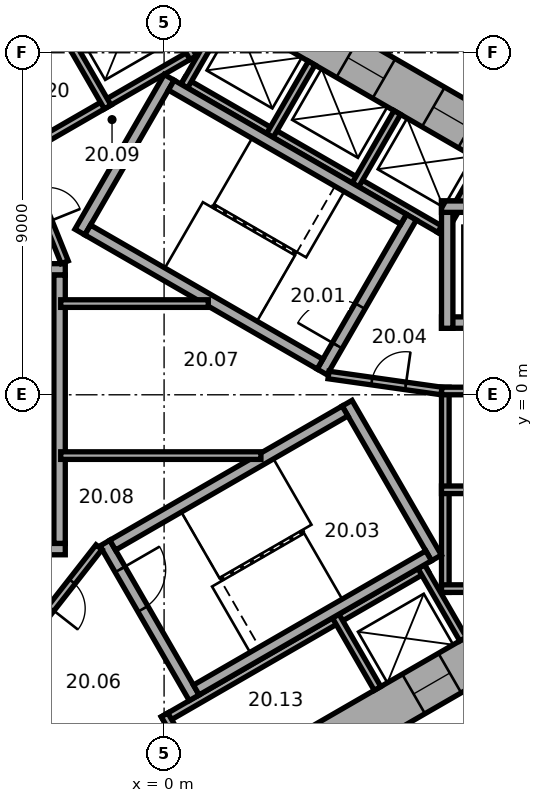
"""IFC4 building model, lengths in metres.
Left out: names, types, materials, properties, quantities, classifications, styles, units other than length and angle.
Written with IfcOpenShell. Run it as: python <this file> out.ifc"""

import sys

from ifc_helpers import new_model, si_unit, direction, frame, frame_2d, origin, place, context, subcontext, project, spatial, rectangle, extrude, element, fill, save


model = new_model("IFC4")
c1 = context("Model", 3, precision=1e-05, world=origin(), true_north=direction((0.0, 1.0)))
c2 = subcontext(c1, "Body", "Model", "MODEL_VIEW")
j1 = project(units=[si_unit("LENGTHUNIT", "METRE"), si_unit("PLANEANGLEUNIT", "RADIAN")], contexts=[c1])
p1 = place(None, origin())
s1 = spatial("IfcSite", under=j1, at=p1, CompositionType="ELEMENT")
p2 = place(p1, origin())
s2 = spatial("IfcBuilding", under=s1, at=p2, CompositionType="ELEMENT")
p3 = place(p2, frame((0.0, 0.0, 90.2)))
s3 = spatial("IfcBuildingStorey", under=s2, at=p3, CompositionType="ELEMENT", Elevation=90.2)
p4 = place(p3, frame((10.4, 5.658, 0.0), z_axis=(0.0, 0.0, 1.0), x_axis=(-0.866021384402, 0.500006961711, 0.0)))
e1 = element("IfcWall", 1, at=p4, inside=s3, PredefinedType="SHEAR", context=c2, shape_type="SweptSolid", body=[
    extrude(rectangle(XDim=12.355, YDim=1.2, at=frame_2d((6.178, 0.0))), origin(), (0.0, 0.0, 1.0), 3.3),
])
p5 = place(p4, frame((2.728, 0.0, 0.0)))
e2 = element("IfcOpeningElement", 2, at=p5, cuts=e1, PredefinedType="OPENING", context=c2, shape_type="SweptSolid", body=[
    extrude(rectangle(XDim=1.1, YDim=2.1, at=frame_2d((0.55, 1.05))), frame((0.0, 0.61, 0.0), z_axis=(0.0, -1.0, 0.0), x_axis=(1.0, 0.0, 0.0)), (0.0, 0.0, 1.0), 1.22),
])
p6 = place(p4, frame((5.328, 0.0, 0.0)))
e3 = element("IfcOpeningElement", 3, at=p6, cuts=e1, PredefinedType="OPENING", context=c2, shape_type="SweptSolid", body=[
    extrude(rectangle(XDim=1.1, YDim=2.1, at=frame_2d((0.55, 1.05))), frame((0.0, 0.61, 0.0), z_axis=(0.0, -1.0, 0.0), x_axis=(1.0, 0.0, 0.0)), (0.0, 0.0, 1.0), 1.22),
])
p7 = place(p4, frame((7.928, 0.0, 0.0)))
e4 = element("IfcOpeningElement", 4, at=p7, cuts=e1, PredefinedType="OPENING", context=c2, shape_type="SweptSolid", body=[
    extrude(rectangle(XDim=1.1, YDim=2.1, at=frame_2d((0.55, 1.05))), frame((0.0, 0.61, 0.0), z_axis=(0.0, -1.0, 0.0), x_axis=(1.0, 0.0, 0.0)), (0.0, 0.0, 1.0), 1.22),
])
p8 = place(p3, frame((0.3, 11.836, 0.0), z_axis=(0.0, 0.0, 1.0), x_axis=(-0.866021384402, -0.500006961711, 0.0)))
e5 = element("IfcWall", 5, at=p8, inside=s3, PredefinedType="SHEAR", context=c2, shape_type="SweptSolid", body=[
    extrude(rectangle(XDim=12.355, YDim=1.2, at=frame_2d((6.178, 0.0))), origin(), (0.0, 0.0, 1.0), 3.3),
])
p9 = place(p8, frame((6.378, 0.0, 0.0)))
e6 = element("IfcOpeningElement", 6, at=p9, cuts=e5, PredefinedType="OPENING", context=c2, shape_type="SweptSolid", body=[
    extrude(rectangle(XDim=1.5, YDim=2.1, at=frame_2d((0.75, 1.05))), frame((0.0, 0.61, 0.0), z_axis=(0.0, -1.0, 0.0), x_axis=(1.0, 0.0, 0.0)), (0.0, 0.0, 1.0), 1.22),
])
p10 = place(p8, frame((1.828, 0.0, 0.0)))
e7 = element("IfcOpeningElement", 7, at=p10, cuts=e5, PredefinedType="OPENING", context=c2, shape_type="SweptSolid", body=[
    extrude(rectangle(XDim=1.1, YDim=2.1, at=frame_2d((0.55, 1.05))), frame((0.0, 0.61, 0.0), z_axis=(0.0, -1.0, 0.0), x_axis=(1.0, 0.0, 0.0)), (0.0, 0.0, 1.0), 1.22),
])
p11 = place(p3, frame((-10.4, -5.658, 0.0), z_axis=(0.0, 0.0, 1.0), x_axis=(0.866021384402, -0.500006961711, 0.0)))
e8 = element("IfcWall", 8, at=p11, inside=s3, PredefinedType="SHEAR", context=c2, shape_type="SweptSolid", body=[
    extrude(rectangle(XDim=12.355, YDim=1.2, at=frame_2d((6.178, 0.0))), origin(), (0.0, 0.0, 1.0), 3.3),
])
p12 = place(p11, frame((6.378, 0.0, 0.0)))
e9 = element("IfcOpeningElement", 9, at=p12, cuts=e8, PredefinedType="OPENING", context=c2, shape_type="SweptSolid", body=[
    extrude(rectangle(XDim=1.5, YDim=2.1, at=frame_2d((0.75, 1.05))), frame((0.0, 0.61, 0.0), z_axis=(0.0, -1.0, 0.0), x_axis=(1.0, 0.0, 0.0)), (0.0, 0.0, 1.0), 1.22),
])
p13 = place(p11, frame((3.228, 0.0, 0.0)))
e10 = element("IfcOpeningElement", 10, at=p13, cuts=e8, PredefinedType="OPENING", context=c2, shape_type="SweptSolid", body=[
    extrude(rectangle(XDim=0.9, YDim=2.1, at=frame_2d((0.45, 1.05))), frame((0.0, 0.61, 0.0), z_axis=(0.0, -1.0, 0.0), x_axis=(1.0, 0.0, 0.0)), (0.0, 0.0, 1.0), 1.22),
])
p14 = place(p3, frame((-0.3, -11.836, 0.0), z_axis=(0.0, 0.0, 1.0), x_axis=(0.866021384402, 0.500006961711, 0.0)))
e11 = element("IfcWall", 11, at=p14, inside=s3, PredefinedType="SHEAR", context=c2, shape_type="SweptSolid", body=[
    extrude(rectangle(XDim=12.355, YDim=1.2, at=frame_2d((6.178, 0.0))), origin(), (0.0, 0.0, 1.0), 3.3),
])
p15 = place(p14, frame((4.128, 0.0, 0.0)))
e12 = element("IfcOpeningElement", 12, at=p15, cuts=e11, PredefinedType="OPENING", context=c2, shape_type="SweptSolid", body=[
    extrude(rectangle(XDim=0.9, YDim=2.1, at=frame_2d((0.45, 1.05))), frame((0.0, 0.61, 0.0), z_axis=(0.0, -1.0, 0.0), x_axis=(1.0, 0.0, 0.0)), (0.0, 0.0, 1.0), 1.22),
])
p16 = place(p14, frame((7.928, 0.0, 0.0)))
e13 = element("IfcOpeningElement", 13, at=p16, cuts=e11, PredefinedType="OPENING", context=c2, shape_type="SweptSolid", body=[
    extrude(rectangle(XDim=1.1, YDim=2.1, at=frame_2d((0.55, 1.05))), frame((0.0, 0.61, 0.0), z_axis=(0.0, -1.0, 0.0), x_axis=(1.0, 0.0, 0.0)), (0.0, 0.0, 1.0), 1.22),
])
p17 = place(p3, frame((7.4, -5.2, 0.0), z_axis=(0.0, 0.0, 1.0), x_axis=(0.0, 1.0, 0.0)))
e14 = element("IfcWall", 14, at=p17, inside=s3, PredefinedType="PARTITIONING", context=c2, shape_type="SweptSolid", body=[
    extrude(rectangle(XDim=5.4, YDim=0.2, at=frame_2d((2.7, 0.0))), origin(), (0.0, 0.0, 1.0), 3.05),
])
for number, where, z_axis, x_axis in (
    (15, (7.3, -5.1, 0.0), (0.0, 0.0, 1.0), (1.0, 0.0, 0.0)),
    (16, (7.3, -2.5, 0.0), (0.0, 0.0, 1.0), (1.0, 0.0, 0.0)),
    (17, (7.3, 0.1, 0.0), (0.0, 0.0, 1.0), (1.0, 0.0, 0.0)),
):
    element("IfcWall", number, at=place(p3, frame(where, z_axis=z_axis, x_axis=x_axis)), inside=s3, PredefinedType="PARTITIONING", context=c2, shape_type="SweptSolid", body=[
        extrude(rectangle(XDim=2.2, YDim=0.2, at=frame_2d((1.1, 0.0))), origin(), (0.0, 0.0, 1.0), 3.05),
    ])
p18 = place(p3, frame((7.424, 4.259, 0.0), z_axis=(0.0, 0.0, 1.0), x_axis=(-0.866026010844, 0.49999894854, 0.0)))
e18 = element("IfcWall", 18, at=p18, inside=s3, PredefinedType="PARTITIONING", context=c2, shape_type="SweptSolid", body=[
    extrude(rectangle(XDim=8.0, YDim=0.2, at=frame_2d((4.0, 0.0))), origin(), (0.0, 0.0, 1.0), 3.05),
])
for number, where, z_axis, x_axis in (
    (19, (7.287, 4.222, 0.0), (0.0, 0.0, 1.0), (0.5, 0.866, 0.0)),
    (20, (5.036, 5.522, 0.0), (0.0, 0.0, 1.0), (0.5, 0.866, 0.0)),
    (21, (2.784, 6.822, 0.0), (0.0, 0.0, 1.0), (0.5, 0.866, 0.0)),
    (22, (0.532, 8.122, 0.0), (0.0, 0.0, 1.0), (0.5, 0.866, 0.0)),
):
    element("IfcWall", number, at=place(p3, frame(where, z_axis=z_axis, x_axis=x_axis)), inside=s3, PredefinedType="PARTITIONING", context=c2, shape_type="SweptSolid", body=[
        extrude(rectangle(XDim=2.2, YDim=0.2, at=frame_2d((1.1, 0.0))), origin(), (0.0, 0.0, 1.0), 3.05),
    ])
p19 = place(p3, frame((0.803, 9.009, 0.0), z_axis=(0.0, 0.0, 1.0), x_axis=(-0.866028230842, -0.499995103361, 0.0)))
e23 = element("IfcWall", 23, at=p19, inside=s3, PredefinedType="PARTITIONING", context=c2, shape_type="SweptSolid", body=[
    extrude(rectangle(XDim=5.4, YDim=0.2, at=frame_2d((2.7, 0.0))), origin(), (0.0, 0.0, 1.0), 3.05),
])
p20 = place(p3, frame((0.767, 8.872, 0.0), z_axis=(0.0, 0.0, 1.0), x_axis=(-0.499994660107, 0.866028486751, 0.0)))
e24 = element("IfcWall", 24, at=p20, inside=s3, PredefinedType="PARTITIONING", context=c2, shape_type="SweptSolid", body=[
    extrude(rectangle(XDim=2.2, YDim=0.2, at=frame_2d((1.1, 0.0))), origin(), (0.0, 0.0, 1.0), 3.05),
])
p21 = place(p3, frame((-1.485, 7.572, 0.0), z_axis=(0.0, 0.0, 1.0), x_axis=(-0.50002983664, 0.866008176907, 0.0)))
e25 = element("IfcWall", 25, at=p21, inside=s3, PredefinedType="PARTITIONING", context=c2, shape_type="SweptSolid", body=[
    extrude(rectangle(XDim=2.2, YDim=0.2, at=frame_2d((1.1, 0.0))), origin(), (0.0, 0.0, 1.0), 3.05),
])
p22 = place(p3, frame((-0.024, -8.559, 0.0), z_axis=(0.0, 0.0, 1.0), x_axis=(0.866026010844, 0.49999894854, 0.0)))
e26 = element("IfcWall", 26, at=p22, inside=s3, PredefinedType="PARTITIONING", context=c2, shape_type="SweptSolid", body=[
    extrude(rectangle(XDim=8.0, YDim=0.2, at=frame_2d((4.0, 0.0))), origin(), (0.0, 0.0, 1.0), 3.05),
])
for number, where, z_axis, x_axis in (
    (27, (0.013, -8.422, 0.0), (0.0, 0.0, 1.0), (0.5, -0.866, 0.0)),
    (28, (4.516, -5.822, 0.0), (0.0, 0.0, 1.0), (0.5, -0.866, 0.0)),
    (29, (6.768, -4.522, 0.0), (0.0, 0.0, 1.0), (0.5, -0.866, 0.0)),
):
    element("IfcWall", number, at=place(p3, frame(where, z_axis=z_axis, x_axis=x_axis)), inside=s3, PredefinedType="PARTITIONING", context=c2, shape_type="SweptSolid", body=[
        extrude(rectangle(XDim=2.2, YDim=0.2, at=frame_2d((1.1, 0.0))), origin(), (0.0, 0.0, 1.0), 3.05),
    ])
p23 = place(p3, frame((4.158, 0.602, 0.0), z_axis=(0.0, 0.0, 1.0), x_axis=(0.499977259774, 0.866038532462, 0.0)))
e30 = element("IfcWall", 30, at=p23, inside=s3, PredefinedType="SHEAR", context=c2, shape_type="SweptSolid", body=[
    extrude(rectangle(XDim=4.7, YDim=0.3, at=frame_2d((2.35, 0.0))), origin(), (0.0, 0.0, 1.0), 3.05),
])
p24 = place(p23, frame((0.8, 0.0, 0.0)))
e31 = element("IfcOpeningElement", 31, at=p24, cuts=e30, PredefinedType="OPENING", context=c2, shape_type="SweptSolid", body=[
    extrude(rectangle(XDim=1.2, YDim=2.1, at=frame_2d((0.6, 1.05))), frame((0.0, 0.16, 0.0), z_axis=(0.0, -1.0, 0.0), x_axis=(1.0, 0.0, 0.0)), (0.0, 0.0, 1.0), 0.32),
])
p25 = place(p3, frame((-2.216, 4.282, 0.0), z_axis=(0.0, 0.0, 1.0), x_axis=(0.499977259774, 0.866038532462, 0.0)))
e32 = element("IfcWall", 32, at=p25, inside=s3, PredefinedType="SHEAR", context=c2, shape_type="SweptSolid", body=[
    extrude(rectangle(XDim=4.7, YDim=0.3, at=frame_2d((2.35, 0.0))), origin(), (0.0, 0.0, 1.0), 3.05),
])
for number, where, z_axis, x_axis in (
    (33, (4.103, 0.807, 0.0), (0.0, 0.0, 1.0), (-0.866, 0.5, 0.0)),
    (34, (6.303, 4.617, 0.0), (0.0, 0.0, 1.0), (-0.866, 0.5, 0.0)),
):
    element("IfcWall", number, at=place(p3, frame(where, z_axis=z_axis, x_axis=x_axis)), inside=s3, PredefinedType="SHEAR", context=c2, shape_type="SweptSolid", body=[
        extrude(rectangle(XDim=7.06, YDim=0.3, at=frame_2d((3.53, 0.0))), origin(), (0.0, 0.0, 1.0), 3.05),
    ])
p26 = place(p3, frame((-2.6, 3.3, 0.0), z_axis=(0.0, 0.0, 1.0), x_axis=(-1.0, 0.0, 0.0)))
e35 = element("IfcWall", 35, at=p26, inside=s3, PredefinedType="SHEAR", context=c2, shape_type="SweptSolid", body=[
    extrude(rectangle(XDim=4.7, YDim=0.3, at=frame_2d((2.35, 0.0))), origin(), (0.0, 0.0, 1.0), 3.05),
])
p27 = place(p26, frame((0.8, 0.0, 0.0)))
e36 = element("IfcOpeningElement", 36, at=p27, cuts=e35, PredefinedType="OPENING", context=c2, shape_type="SweptSolid", body=[
    extrude(rectangle(XDim=1.2, YDim=2.1, at=frame_2d((0.6, 1.05))), frame((0.0, 0.16, 0.0), z_axis=(0.0, -1.0, 0.0), x_axis=(1.0, 0.0, 0.0)), (0.0, 0.0, 1.0), 0.32),
])
p28 = place(p3, frame((-2.6, -4.06, 0.0), z_axis=(0.0, 0.0, 1.0), x_axis=(-1.0, 0.0, 0.0)))
e37 = element("IfcWall", 37, at=p28, inside=s3, PredefinedType="SHEAR", context=c2, shape_type="SweptSolid", body=[
    extrude(rectangle(XDim=4.7, YDim=0.3, at=frame_2d((2.35, 0.0))), origin(), (0.0, 0.0, 1.0), 3.05),
])
p29 = place(p3, frame((-2.75, 3.15, 0.0), z_axis=(0.0, 0.0, 1.0), x_axis=(0.0, -1.0, 0.0)))
e38 = element("IfcWall", 38, at=p29, inside=s3, PredefinedType="SHEAR", context=c2, shape_type="SweptSolid", body=[
    extrude(rectangle(XDim=7.06, YDim=0.3, at=frame_2d((3.53, 0.0))), origin(), (0.0, 0.0, 1.0), 3.05),
])
p30 = place(p3, frame((-1.558, -3.902, 0.0), z_axis=(0.0, 0.0, 1.0), x_axis=(0.499977259774, -0.866038532462, 0.0)))
e39 = element("IfcWall", 39, at=p30, inside=s3, PredefinedType="SHEAR", context=c2, shape_type="SweptSolid", body=[
    extrude(rectangle(XDim=4.7, YDim=0.3, at=frame_2d((2.35, 0.0))), origin(), (0.0, 0.0, 1.0), 3.05),
])
p31 = place(p30, frame((0.8, 0.0, 0.0)))
e40 = element("IfcOpeningElement", 40, at=p31, cuts=e39, PredefinedType="OPENING", context=c2, shape_type="SweptSolid", body=[
    extrude(rectangle(XDim=1.2, YDim=2.1, at=frame_2d((0.6, 1.05))), frame((0.0, 0.16, 0.0), z_axis=(0.0, -1.0, 0.0), x_axis=(1.0, 0.0, 0.0)), (0.0, 0.0, 1.0), 0.32),
])
p32 = place(p3, frame((4.816, -0.222, 0.0), z_axis=(0.0, 0.0, 1.0), x_axis=(0.499977259774, -0.866038532462, 0.0)))
e41 = element("IfcWall", 41, at=p32, inside=s3, PredefinedType="SHEAR", context=c2, shape_type="SweptSolid", body=[
    extrude(rectangle(XDim=4.7, YDim=0.3, at=frame_2d((2.35, 0.0))), origin(), (0.0, 0.0, 1.0), 3.05),
])
for number, where, z_axis, x_axis in (
    (42, (-1.353, -3.957, 0.0), (0.0, 0.0, 1.0), (0.866, 0.5, 0.0)),
    (43, (0.847, -7.767, 0.0), (0.0, 0.0, 1.0), (0.866, 0.5, 0.0)),
):
    element("IfcWall", number, at=place(p3, frame(where, z_axis=z_axis, x_axis=x_axis)), inside=s3, PredefinedType="SHEAR", context=c2, shape_type="SweptSolid", body=[
        extrude(rectangle(XDim=7.06, YDim=0.3, at=frame_2d((3.53, 0.0))), origin(), (0.0, 0.0, 1.0), 3.05),
    ])
p33 = place(p3, frame((7.3, 1.9, 0.0), z_axis=(0.0, 0.0, 1.0), x_axis=(1.0, 0.0, 0.0)))
e44 = element("IfcWall", 44, at=p33, inside=s3, PredefinedType="SHEAR", context=c2, shape_type="SweptSolid", body=[
    extrude(rectangle(XDim=2.2, YDim=0.3, at=frame_2d((1.1, 0.0))), origin(), (0.0, 0.0, 1.0), 3.05),
])
p34 = place(p33, frame((0.7, 0.0, 0.0)))
e45 = element("IfcOpeningElement", 45, at=p34, cuts=e44, PredefinedType="OPENING", context=c2, shape_type="SweptSolid", body=[
    extrude(rectangle(XDim=1.1, YDim=2.1, at=frame_2d((0.55, 1.05))), frame((0.0, 0.16, 0.0), z_axis=(0.0, -1.0, 0.0), x_axis=(1.0, 0.0, 0.0)), (0.0, 0.0, 1.0), 0.32),
])
p35 = place(p3, frame((7.45, 1.75, 0.0), z_axis=(0.0, 0.0, 1.0), x_axis=(0.0, 1.0, 0.0)))
e46 = element("IfcWall", 46, at=p35, inside=s3, PredefinedType="SHEAR", context=c2, shape_type="SweptSolid", body=[
    extrude(rectangle(XDim=3.35, YDim=0.3, at=frame_2d((1.675, 0.0))), origin(), (0.0, 0.0, 1.0), 3.05),
])
p36 = place(p3, frame((7.3, 4.95, 0.0), z_axis=(0.0, 0.0, 1.0), x_axis=(1.0, 0.0, 0.0)))
e47 = element("IfcWall", 47, at=p36, inside=s3, PredefinedType="SHEAR", context=c2, shape_type="SweptSolid", body=[
    extrude(rectangle(XDim=2.2, YDim=0.3, at=frame_2d((1.1, 0.0))), origin(), (0.0, 0.0, 1.0), 3.05),
])
p37 = place(p3, frame((4.327, 0.521, 0.0), z_axis=(0.0, 0.0, 1.0), x_axis=(0.990124376366, -0.14019172346, 0.0)))
e48 = element("IfcWall", 48, at=p37, inside=s3, PredefinedType="PARTITIONING", context=c2, shape_type="SweptSolid", body=[
    extrude(rectangle(XDim=3.002, YDim=0.2, at=frame_2d((1.501, 0.0))), origin(), (0.0, 0.0, 1.0), 3.05),
])
p38 = place(p37, frame((1.15, 0.0, 0.0)))
e49 = element("IfcOpeningElement", 49, at=p38, cuts=e48, PredefinedType="OPENING", context=c2, shape_type="SweptSolid", body=[
    extrude(rectangle(XDim=0.9, YDim=2.1, at=frame_2d((0.45, 1.05))), frame((0.0, 0.11, 0.0), z_axis=(0.0, -1.0, 0.0), x_axis=(1.0, 0.0, 0.0)), (0.0, 0.0, 1.0), 0.22),
])
p39 = place(p3, frame((-2.615, 3.487, 0.0), z_axis=(0.0, 0.0, 1.0), x_axis=(-0.373576831041, 0.92759924068, 0.0)))
e50 = element("IfcWall", 50, at=p39, inside=s3, PredefinedType="PARTITIONING", context=c2, shape_type="SweptSolid", body=[
    extrude(rectangle(XDim=3.002, YDim=0.2, at=frame_2d((1.501, 0.0))), origin(), (0.0, 0.0, 1.0), 3.05),
])
p40 = place(p39, frame((1.15, 0.0, 0.0)))
e51 = element("IfcOpeningElement", 51, at=p40, cuts=e50, PredefinedType="OPENING", context=c2, shape_type="SweptSolid", body=[
    extrude(rectangle(XDim=0.9, YDim=2.1, at=frame_2d((0.45, 1.05))), frame((0.0, 0.11, 0.0), z_axis=(0.0, -1.0, 0.0), x_axis=(1.0, 0.0, 0.0)), (0.0, 0.0, 1.0), 0.22),
])
p41 = place(p3, frame((-1.712, -4.008, 0.0), z_axis=(0.0, 0.0, 1.0), x_axis=(-0.616549420702, -0.787316208287, 0.0)))
e52 = element("IfcWall", 52, at=p41, inside=s3, PredefinedType="PARTITIONING", context=c2, shape_type="SweptSolid", body=[
    extrude(rectangle(XDim=3.002, YDim=0.2, at=frame_2d((1.501, 0.0))), origin(), (0.0, 0.0, 1.0), 3.05),
])
p42 = place(p41, frame((1.15, 0.0, 0.0)))
e53 = element("IfcOpeningElement", 53, at=p42, cuts=e52, PredefinedType="OPENING", context=c2, shape_type="SweptSolid", body=[
    extrude(rectangle(XDim=0.9, YDim=2.1, at=frame_2d((0.45, 1.05))), frame((0.0, 0.11, 0.0), z_axis=(0.0, -1.0, 0.0), x_axis=(1.0, 0.0, 0.0)), (0.0, 0.0, 1.0), 0.22),
])
p43 = place(p3, frame((-2.72, -1.6, 0.0), z_axis=(0.0, 0.0, 1.0), x_axis=(1.0, 0.0, 0.0)))
e54 = element("IfcWall", 54, at=p43, inside=s3, PredefinedType="PARTITIONING", context=c2, shape_type="SweptSolid", body=[
    extrude(rectangle(XDim=5.269, YDim=0.2, at=frame_2d((2.634, 0.0))), origin(), (0.0, 0.0, 1.0), 3.05),
])
p44 = place(p3, frame((-2.72, 2.4, 0.0), z_axis=(0.0, 0.0, 1.0), x_axis=(1.0, 0.0, 0.0)))
e55 = element("IfcWall", 55, at=p44, inside=s3, PredefinedType="PARTITIONING", context=c2, shape_type="SweptSolid", body=[
    extrude(rectangle(XDim=3.883, YDim=0.2, at=frame_2d((1.941, 0.0))), origin(), (0.0, 0.0, 1.0), 3.05),
])
p45 = place(p3, frame((-11.615, -7.843, 0.0), z_axis=(0.0, 0.0, 1.0), x_axis=(0.866026466995, -0.499998158461, 0.0)))
e56 = element("IfcWall", 56, at=p45, inside=s3, PredefinedType="PARTITIONING", context=c2, shape_type="SweptSolid", body=[
    extrude(rectangle(XDim=12.315, YDim=0.2, at=frame_2d((6.158, 0.0))), origin(), (0.0, 0.0, 1.0), 3.05),
])
p46 = place(p45, frame((1.665, 0.0, 0.0)))
e57 = element("IfcOpeningElement", 57, at=p46, cuts=e56, PredefinedType="OPENING", context=c2, shape_type="SweptSolid", body=[
    extrude(rectangle(XDim=0.9, YDim=2.1, at=frame_2d((0.45, 1.05))), frame((0.0, 0.11, 0.0), z_axis=(0.0, -1.0, 0.0), x_axis=(1.0, 0.0, 0.0)), (0.0, 0.0, 1.0), 0.22),
])
p47 = place(p45, frame((7.65, 0.0, 0.0)))
e58 = element("IfcOpeningElement", 58, at=p47, cuts=e56, PredefinedType="OPENING", context=c2, shape_type="SweptSolid", body=[
    extrude(rectangle(XDim=0.9, YDim=2.1, at=frame_2d((0.45, 1.05))), frame((0.0, 0.11, 0.0), z_axis=(0.0, -1.0, 0.0), x_axis=(1.0, 0.0, 0.0)), (0.0, 0.0, 1.0), 0.22),
])
p48 = place(p45, frame((9.317, 0.0, 0.0)))
e59 = element("IfcOpeningElement", 59, at=p48, cuts=e56, PredefinedType="OPENING", context=c2, shape_type="SweptSolid", body=[
    extrude(rectangle(XDim=0.9, YDim=2.1, at=frame_2d((0.45, 1.05))), frame((0.0, 0.11, 0.0), z_axis=(0.0, -1.0, 0.0), x_axis=(1.0, 0.0, 0.0)), (0.0, 0.0, 1.0), 0.22),
])
p49 = place(p24, origin())
e60 = element("IfcDoor", 60, at=p49, inside=s3, OperationType="SINGLE_SWING_RIGHT", PredefinedType="DOOR", context=c2, shape_type="SweptSolid", body=[
    extrude(rectangle(XDim=1.2, YDim=2.1, at=frame_2d((0.6, 1.05))), frame((0.0, 0.025, 0.0), z_axis=(0.0, -1.0, 0.0), x_axis=(1.0, 0.0, 0.0)), (0.0, 0.0, 1.0), 0.05),
])
fill(e31, e60)
p50 = place(p31, origin())
e61 = element("IfcDoor", 61, at=p50, inside=s3, OperationType="SINGLE_SWING_RIGHT", PredefinedType="DOOR", context=c2, shape_type="SweptSolid", body=[
    extrude(rectangle(XDim=1.2, YDim=2.1, at=frame_2d((0.6, 1.05))), frame((0.0, 0.025, 0.0), z_axis=(0.0, -1.0, 0.0), x_axis=(1.0, 0.0, 0.0)), (0.0, 0.0, 1.0), 0.05),
])
fill(e40, e61)
p51 = place(p38, origin())
e62 = element("IfcDoor", 62, at=p51, inside=s3, OperationType="SINGLE_SWING_LEFT", PredefinedType="DOOR", context=c2, shape_type="SweptSolid", body=[
    extrude(rectangle(XDim=0.9, YDim=2.1, at=frame_2d((0.45, 1.05))), frame((0.0, 0.025, 0.0), z_axis=(0.0, -1.0, 0.0), x_axis=(1.0, 0.0, 0.0)), (0.0, 0.0, 1.0), 0.05),
])
fill(e49, e62)
p52 = place(p42, origin())
e63 = element("IfcDoor", 63, at=p52, inside=s3, OperationType="SINGLE_SWING_LEFT", PredefinedType="DOOR", context=c2, shape_type="SweptSolid", body=[
    extrude(rectangle(XDim=0.9, YDim=2.1, at=frame_2d((0.45, 1.05))), frame((0.0, 0.025, 0.0), z_axis=(0.0, -1.0, 0.0), x_axis=(1.0, 0.0, 0.0)), (0.0, 0.0, 1.0), 0.05),
])
fill(e53, e63)
p53 = place(p5, origin())
e64 = element("IfcDoor", 64, at=p53, inside=s3, OperationType="DOUBLE_DOOR_SLIDING", PredefinedType="DOOR", context=c2, shape_type="SweptSolid", body=[
    extrude(rectangle(XDim=1.1, YDim=2.1, at=frame_2d((0.55, 1.05))), frame((0.0, 0.025, 0.0), z_axis=(0.0, -1.0, 0.0), x_axis=(1.0, 0.0, 0.0)), (0.0, 0.0, 1.0), 0.05),
])
fill(e2, e64)
p54 = place(p6, origin())
e65 = element("IfcDoor", 65, at=p54, inside=s3, OperationType="DOUBLE_DOOR_SLIDING", PredefinedType="DOOR", context=c2, shape_type="SweptSolid", body=[
    extrude(rectangle(XDim=1.1, YDim=2.1, at=frame_2d((0.55, 1.05))), frame((0.0, 0.025, 0.0), z_axis=(0.0, -1.0, 0.0), x_axis=(1.0, 0.0, 0.0)), (0.0, 0.0, 1.0), 0.05),
])
fill(e3, e65)
p55 = place(p16, origin())
e66 = element("IfcDoor", 66, at=p55, inside=s3, OperationType="DOUBLE_DOOR_SLIDING", PredefinedType="DOOR", context=c2, shape_type="SweptSolid", body=[
    extrude(rectangle(XDim=1.1, YDim=2.1, at=frame_2d((0.55, 1.05))), frame((0.0, 0.025, 0.0), z_axis=(0.0, -1.0, 0.0), x_axis=(1.0, 0.0, 0.0)), (0.0, 0.0, 1.0), 0.05),
])
fill(e13, e66)
save(model, sys.argv[1])
